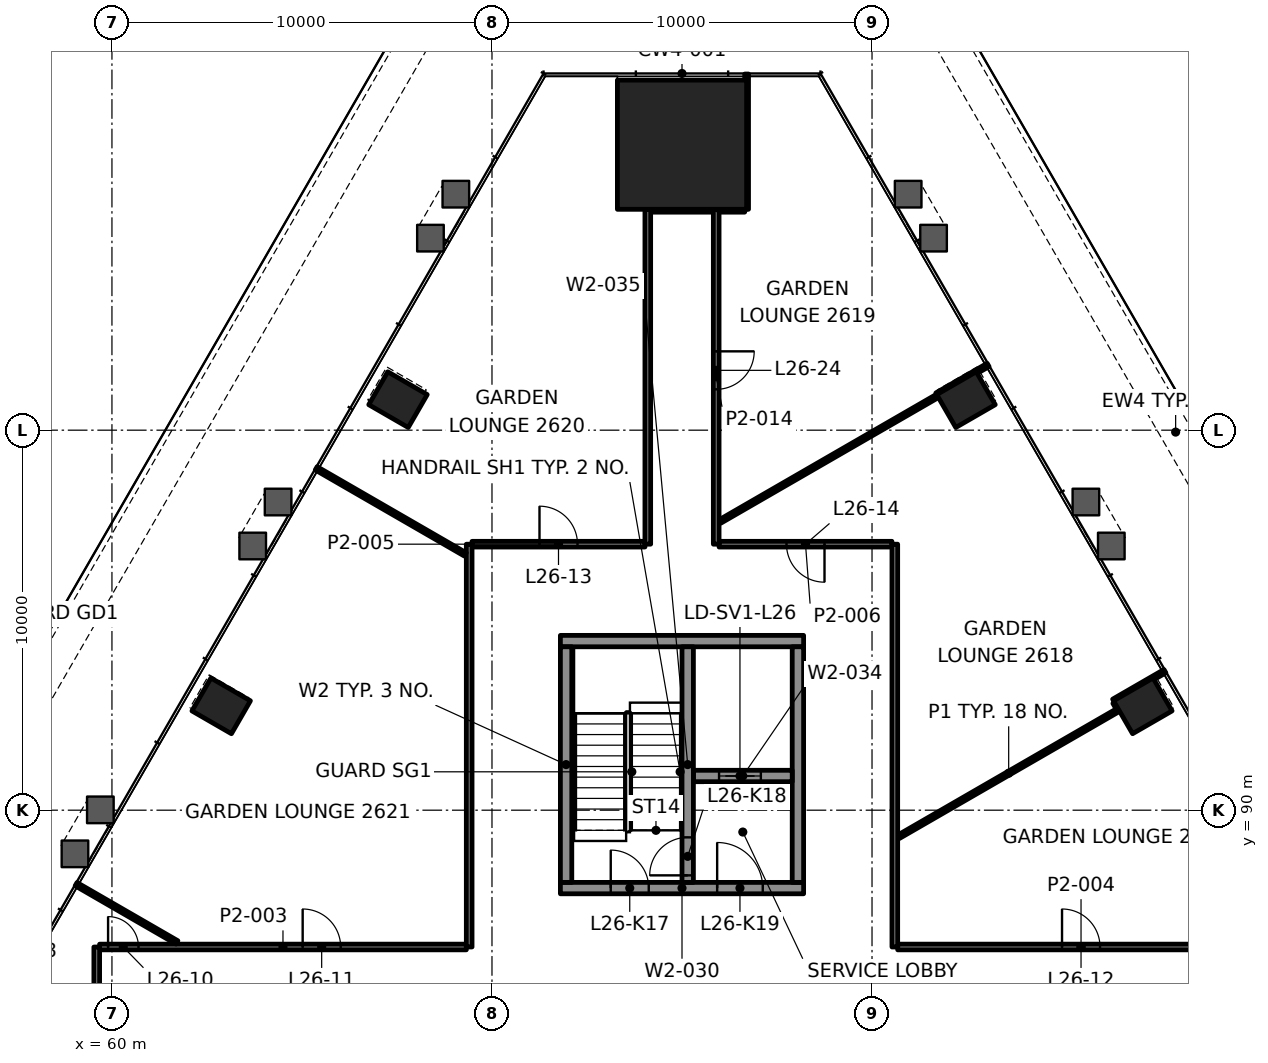
"""IFC4 building model, lengths in metres.
Left out: names, types, materials, properties, quantities, classifications, styles, units other than length and angle.
Written with IfcOpenShell. Run it as: python <this file> out.ifc"""

import sys

from ifc_helpers import new_model, si_unit, direction, frame, frame_2d, origin, origin_2d, place, context, subcontext, project, spatial, rectangle, extrude, element, fill, save


model = new_model("IFC4")
c1 = context("Model", 3, precision=1e-05, world=origin(), true_north=direction((0.0, 1.0)))
c2 = subcontext(c1, "Body", "Model", "MODEL_VIEW")
j1 = project(units=[si_unit("LENGTHUNIT", "METRE"), si_unit("PLANEANGLEUNIT", "RADIAN")], contexts=[c1])
p1 = place(None, origin())
s1 = spatial("IfcSite", under=j1, at=p1, CompositionType="ELEMENT")
p2 = place(p1, origin())
s2 = spatial("IfcBuilding", under=s1, at=p2, CompositionType="ELEMENT")
p3 = place(p2, frame((0.0, 0.0, 115.6)))
s3 = spatial("IfcBuildingStorey", under=s2, at=p3, CompositionType="ELEMENT", Elevation=115.6)
p4 = place(p3, frame((75.0, 107.512, 0.0), z_axis=(0.0, 0.0, 1.0), x_axis=(-1.0, 0.0, 0.0)))
e1 = element("IfcColumn", 1, at=p4, inside=s3, PredefinedType="COLUMN", context=c2, shape_type="SweptSolid", body=[
    extrude(rectangle(XDim=3.4, YDim=3.4, at=origin_2d()), origin(), (0.0, 0.0, 1.0), 4.2),
])
for number, where, z_axis, x_axis in (
    (2, (87.126, 92.745, -0.0), (0.0, 0.0, 1.0), (-0.5, 0.866, 0.0)),
    (3, (82.473, 100.804, -0.0), (0.0, 0.0, 1.0), (-0.5, 0.866, 0.0)),
    (4, (67.527, 100.804, -0.0), (0.0, 0.0, 1.0), (-0.5, -0.866, 0.0)),
    (5, (62.874, 92.745, -0.0), (0.0, 0.0, 1.0), (-0.5, -0.866, 0.0)),
):
    element("IfcColumn", number, at=place(p3, frame(where, z_axis=z_axis, x_axis=x_axis)), inside=s3, PredefinedType="COLUMN", context=c2, shape_type="SweptSolid", body=[
        extrude(rectangle(XDim=1.0, YDim=1.2, at=origin_2d()), origin(), (0.0, 0.0, 1.0), 4.2),
    ])
p5 = place(p3, frame((71.8, 87.95, 0.0), z_axis=(0.0, 0.0, 1.0), x_axis=(1.0, 0.0, 0.0)))
e6 = element("IfcWall", 6, at=p5, inside=s3, PredefinedType="SHEAR", context=c2, shape_type="SweptSolid", body=[
    extrude(rectangle(XDim=6.4, YDim=0.3, at=frame_2d((3.2, 0.0))), origin(), (0.0, 0.0, 1.0), 4.0),
])
p6 = place(p5, frame((1.325, 0.0, 0.0)))
e7 = element("IfcOpeningElement", 7, at=p6, cuts=e6, PredefinedType="OPENING", context=c2, shape_type="SweptSolid", body=[
    extrude(rectangle(XDim=1.0, YDim=2.1, at=frame_2d((0.5, 1.05))), frame((0.0, 0.16, 0.0), z_axis=(0.0, -1.0, 0.0), x_axis=(1.0, 0.0, 0.0)), (0.0, 0.0, 1.0), 0.32),
])
p7 = place(p5, frame((4.125, 0.0, 0.0)))
e8 = element("IfcOpeningElement", 8, at=p7, cuts=e6, PredefinedType="OPENING", context=c2, shape_type="SweptSolid", body=[
    extrude(rectangle(XDim=1.2, YDim=2.1, at=frame_2d((0.6, 1.05))), frame((0.0, 0.16, 0.0), z_axis=(0.0, -1.0, 0.0), x_axis=(1.0, 0.0, 0.0)), (0.0, 0.0, 1.0), 0.32),
])
p8 = place(p3, frame((71.8, 94.45, 0.0), z_axis=(0.0, 0.0, 1.0), x_axis=(1.0, 0.0, 0.0)))
e9 = element("IfcWall", 9, at=p8, inside=s3, PredefinedType="SHEAR", context=c2, shape_type="SweptSolid", body=[
    extrude(rectangle(XDim=6.4, YDim=0.3, at=frame_2d((3.2, 0.0))), origin(), (0.0, 0.0, 1.0), 4.0),
])
for number, where, z_axis, x_axis in (
    (10, (71.95, 88.1, 0.0), (0.0, 0.0, 1.0), (0.0, 1.0, 0.0)),
    (11, (78.05, 88.1, 0.0), (0.0, 0.0, 1.0), (0.0, 1.0, 0.0)),
):
    element("IfcWall", number, at=place(p3, frame(where, z_axis=z_axis, x_axis=x_axis)), inside=s3, PredefinedType="SHEAR", context=c2, shape_type="SweptSolid", body=[
        extrude(rectangle(XDim=6.2, YDim=0.3, at=frame_2d((3.1, 0.0))), origin(), (0.0, 0.0, 1.0), 4.0),
    ])
p9 = place(p3, frame((75.3, 90.9, 0.0), z_axis=(0.0, 0.0, 1.0), x_axis=(1.0, 0.0, 0.0)))
e12 = element("IfcWall", 12, at=p9, inside=s3, PredefinedType="SHEAR", context=c2, shape_type="SweptSolid", body=[
    extrude(rectangle(XDim=2.6, YDim=0.3, at=frame_2d((1.3, 0.0))), origin(), (0.0, 0.0, 1.0), 4.0),
])
p10 = place(p9, frame((0.675, 0.0, 0.0)))
e13 = element("IfcOpeningElement", 13, at=p10, cuts=e12, PredefinedType="OPENING", context=c2, shape_type="SweptSolid", body=[
    extrude(rectangle(XDim=1.1, YDim=2.1, at=frame_2d((0.55, 1.05))), frame((0.0, 0.16, 0.0), z_axis=(0.0, -1.0, 0.0), x_axis=(1.0, 0.0, 0.0)), (0.0, 0.0, 1.0), 0.32),
])
p11 = place(p3, frame((75.15, 88.1, 0.0), z_axis=(0.0, 0.0, 1.0), x_axis=(0.0, 1.0, 0.0)))
e14 = element("IfcWall", 14, at=p11, inside=s3, PredefinedType="SHEAR", context=c2, shape_type="SweptSolid", body=[
    extrude(rectangle(XDim=6.2, YDim=0.3, at=frame_2d((3.1, 0.0))), origin(), (0.0, 0.0, 1.0), 4.0),
])
p12 = place(p11, frame((0.185, 0.0, 0.0)))
e15 = element("IfcOpeningElement", 15, at=p12, cuts=e14, PredefinedType="OPENING", context=c2, shape_type="SweptSolid", body=[
    extrude(rectangle(XDim=1.0, YDim=2.1, at=frame_2d((0.5, 1.05))), frame((0.0, 0.16, 0.0), z_axis=(0.0, -1.0, 0.0), x_axis=(1.0, 0.0, 0.0)), (0.0, 0.0, 1.0), 0.32),
])
p13 = place(p3, frame((59.676, 86.4, 0.0), z_axis=(0.0, 0.0, 1.0), x_axis=(1.0, 0.0, 0.0)))
e16 = element("IfcWall", 16, at=p13, inside=s3, PredefinedType="PARTITIONING", context=c2, shape_type="SweptSolid", body=[
    extrude(rectangle(XDim=9.649, YDim=0.15, at=frame_2d((4.825, 0.0))), origin(), (0.0, 0.0, 1.0), 3.4),
])
p14 = place(p13, frame((0.223, 0.0, 0.0)))
e17 = element("IfcOpeningElement", 17, at=p14, cuts=e16, PredefinedType="OPENING", context=c2, shape_type="SweptSolid", body=[
    extrude(rectangle(XDim=0.8, YDim=2.1, at=frame_2d((0.4, 1.05))), frame((0.0, 0.085, 0.0), z_axis=(0.0, -1.0, 0.0), x_axis=(1.0, 0.0, 0.0)), (0.0, 0.0, 1.0), 0.17),
])
p15 = place(p13, frame((5.343, 0.0, 0.0)))
e18 = element("IfcOpeningElement", 18, at=p15, cuts=e16, PredefinedType="OPENING", context=c2, shape_type="SweptSolid", body=[
    extrude(rectangle(XDim=1.0, YDim=2.1, at=frame_2d((0.5, 1.05))), frame((0.0, 0.085, 0.0), z_axis=(0.0, -1.0, 0.0), x_axis=(1.0, 0.0, 0.0)), (0.0, 0.0, 1.0), 0.17),
])
p16 = place(p3, frame((80.675, 86.4, 0.0), z_axis=(0.0, 0.0, 1.0), x_axis=(1.0, 0.0, 0.0)))
e19 = element("IfcWall", 19, at=p16, inside=s3, PredefinedType="PARTITIONING", context=c2, shape_type="SweptSolid", body=[
    extrude(rectangle(XDim=9.649, YDim=0.15, at=frame_2d((4.825, 0.0))), origin(), (0.0, 0.0, 1.0), 3.4),
])
p17 = place(p16, frame((4.325, 0.0, 0.0)))
e20 = element("IfcOpeningElement", 20, at=p17, cuts=e19, PredefinedType="OPENING", context=c2, shape_type="SweptSolid", body=[
    extrude(rectangle(XDim=1.0, YDim=2.1, at=frame_2d((0.5, 1.05))), frame((0.0, 0.085, 0.0), z_axis=(0.0, -1.0, 0.0), x_axis=(1.0, 0.0, 0.0)), (0.0, 0.0, 1.0), 0.17),
])
p18 = place(p3, frame((69.476, 97.0, 0.0), z_axis=(0.0, 0.0, 1.0), x_axis=(1.0, 0.0, 0.0)))
e21 = element("IfcWall", 21, at=p18, inside=s3, PredefinedType="PARTITIONING", context=c2, shape_type="SweptSolid", body=[
    extrude(rectangle(XDim=4.549, YDim=0.15, at=frame_2d((2.275, 0.0))), origin(), (0.0, 0.0, 1.0), 3.4),
])
p19 = place(p18, frame((1.775, 0.0, 0.0)))
e22 = element("IfcOpeningElement", 22, at=p19, cuts=e21, PredefinedType="OPENING", context=c2, shape_type="SweptSolid", body=[
    extrude(rectangle(XDim=1.0, YDim=2.1, at=frame_2d((0.5, 1.05))), frame((0.0, 0.085, 0.0), z_axis=(0.0, -1.0, 0.0), x_axis=(1.0, 0.0, 0.0)), (0.0, 0.0, 1.0), 0.17),
])
p20 = place(p3, frame((80.524, 97.0, 0.0), z_axis=(0.0, 0.0, 1.0), x_axis=(-1.0, 0.0, 0.0)))
e23 = element("IfcWall", 23, at=p20, inside=s3, PredefinedType="PARTITIONING", context=c2, shape_type="SweptSolid", body=[
    extrude(rectangle(XDim=4.549, YDim=0.15, at=frame_2d((2.275, 0.0))), origin(), (0.0, 0.0, 1.0), 3.4),
])
p21 = place(p20, frame((1.775, 0.0, 0.0)))
e24 = element("IfcOpeningElement", 24, at=p21, cuts=e23, PredefinedType="OPENING", context=c2, shape_type="SweptSolid", body=[
    extrude(rectangle(XDim=1.0, YDim=2.1, at=frame_2d((0.5, 1.05))), frame((0.0, 0.085, 0.0), z_axis=(0.0, -1.0, 0.0), x_axis=(1.0, 0.0, 0.0)), (0.0, 0.0, 1.0), 0.17),
])
p22 = place(p3, frame((74.176, 105.812, 0.0), z_axis=(0.0, 0.0, 1.0), x_axis=(1.0, 0.0, 0.0)))
e25 = element("IfcWall", 25, at=p22, inside=s3, PredefinedType="PARTITIONING", context=c2, shape_type="SweptSolid", body=[
    extrude(rectangle(XDim=1.649, YDim=0.15, at=frame_2d((0.825, 0.0))), origin(), (0.0, 0.0, 1.0), 3.397),
])
p23 = place(p3, frame((80.701, 89.302, 0.0), z_axis=(0.0, 0.0, 1.0), x_axis=(0.866032345022, 0.499987977232, 0.0)))
e26 = element("IfcWall", 26, at=p23, inside=s3, PredefinedType="PARTITIONING", context=c2, shape_type="SweptSolid", body=[
    extrude(rectangle(XDim=6.686, YDim=0.1, at=frame_2d((3.343, 0.0))), origin(), (0.0, 0.0, 1.0), 3.4),
])
p24 = place(p3, frame((86.356, 92.879, 0.0), z_axis=(0.0, 0.0, 1.0), x_axis=(0.866018739521, 0.500011542666, 0.0)))
e27 = element("IfcWall", 27, at=p24, inside=s3, PredefinedType="PARTITIONING", context=c2, shape_type="SweptSolid", body=[
    extrude(rectangle(XDim=1.56, YDim=0.1, at=frame_2d((0.78, 0.0))), origin(), (0.0, 0.0, 1.0), 3.165),
])
p25 = place(p3, frame((76.001, 97.598, 0.0), z_axis=(0.0, 0.0, 1.0), x_axis=(0.866017611601, 0.500013496215, 0.0)))
e28 = element("IfcWall", 28, at=p25, inside=s3, PredefinedType="PARTITIONING", context=c2, shape_type="SweptSolid", body=[
    extrude(rectangle(XDim=6.608, YDim=0.1, at=frame_2d((3.304, 0.0))), origin(), (0.0, 0.0, 1.0), 3.4),
])
p26 = place(p3, frame((81.704, 100.937, 0.0), z_axis=(0.0, 0.0, 1.0), x_axis=(0.865990094875, 0.500061151839, 0.0)))
e29 = element("IfcWall", 29, at=p26, inside=s3, PredefinedType="PARTITIONING", context=c2, shape_type="SweptSolid", body=[
    extrude(rectangle(XDim=1.56, YDim=0.1, at=frame_2d((0.78, 0.0))), origin(), (0.0, 0.0, 1.0), 3.4),
])
p27 = place(p3, frame((80.6, 86.4, 0.0), z_axis=(0.0, 0.0, 1.0), x_axis=(0.0, 1.0, 0.0)))
e30 = element("IfcWall", 30, at=p27, inside=s3, PredefinedType="PARTITIONING", context=c2, shape_type="SweptSolid", body=[
    extrude(rectangle(XDim=10.6, YDim=0.15, at=frame_2d((5.3, 0.0))), origin(), (0.0, 0.0, 1.0), 3.322),
])
p28 = place(p3, frame((76.7, 105.813, 0.0), z_axis=(0.0, 0.0, 1.0), x_axis=(0.0, 1.0, 0.0)))
e31 = element("IfcWall", 31, at=p28, inside=s3, PredefinedType="PARTITIONING", context=c2, shape_type="SweptSolid", body=[
    extrude(rectangle(XDim=3.559, YDim=0.1, at=frame_2d((1.78, 0.0))), origin(), (0.0, 0.0, 1.0), 3.4),
])
p29 = place(p3, frame((75.9, 105.812, 0.0), z_axis=(0.0, 0.0, 1.0), x_axis=(0.0, -1.0, 0.0)))
e32 = element("IfcWall", 32, at=p29, inside=s3, PredefinedType="PARTITIONING", context=c2, shape_type="SweptSolid", body=[
    extrude(rectangle(XDim=8.812, YDim=0.15, at=frame_2d((4.406, 0.0))), origin(), (0.0, 0.0, 1.0), 3.4),
])
p30 = place(p29, frame((3.738, 0.0, 0.0)))
e33 = element("IfcOpeningElement", 33, at=p30, cuts=e32, PredefinedType="OPENING", context=c2, shape_type="SweptSolid", body=[
    extrude(rectangle(XDim=1.0, YDim=2.1, at=frame_2d((0.5, 1.05))), frame((0.0, 0.085, 0.0), z_axis=(0.0, -1.0, 0.0), x_axis=(1.0, 0.0, 0.0)), (0.0, 0.0, 1.0), 0.17),
])
p31 = place(p3, frame((74.1, 97.0, 0.0), z_axis=(0.0, 0.0, 1.0), x_axis=(0.0, 1.0, 0.0)))
e34 = element("IfcWall", 34, at=p31, inside=s3, PredefinedType="PARTITIONING", context=c2, shape_type="SweptSolid", body=[
    extrude(rectangle(XDim=8.812, YDim=0.15, at=frame_2d((4.406, 0.0))), origin(), (0.0, 0.0, 1.0), 3.4),
])
p32 = place(p3, frame((69.4, 86.4, 0.0), z_axis=(0.0, 0.0, 1.0), x_axis=(0.0, 1.0, 0.0)))
e35 = element("IfcWall", 35, at=p32, inside=s3, PredefinedType="PARTITIONING", context=c2, shape_type="SweptSolid", body=[
    extrude(rectangle(XDim=10.6, YDim=0.15, at=frame_2d((5.3, 0.0))), origin(), (0.0, 0.0, 1.0), 3.322),
])
p33 = place(p3, frame((59.6, 67.148, 0.0), z_axis=(0.0, 0.0, 1.0), x_axis=(0.0, 1.0, 0.0)))
e36 = element("IfcWall", 36, at=p33, inside=s3, PredefinedType="PARTITIONING", context=c2, shape_type="SweptSolid", body=[
    extrude(rectangle(XDim=19.251, YDim=0.15, at=frame_2d((9.626, 0.0))), origin(), (0.0, 0.0, 1.0), 3.4),
])
p34 = place(p3, frame((86.466, 92.688, 0.0), z_axis=(0.0, 0.0, 1.0), x_axis=(-0.500013496215, 0.866017611601, 0.0)))
e37 = element("IfcWall", 37, at=p34, inside=s3, PredefinedType="PARTITIONING", context=c2, shape_type="SweptSolid", body=[
    extrude(rectangle(XDim=0.169, YDim=0.1, at=frame_2d((0.085, 0.0))), origin(), (0.0, 0.0, 1.0), 3.4),
])
p35 = place(p3, frame((69.299, 96.73, 0.0), z_axis=(0.0, 0.0, 1.0), x_axis=(-0.866033061154, 0.499986736812, 0.0)))
e38 = element("IfcWall", 38, at=p35, inside=s3, PredefinedType="PARTITIONING", context=c2, shape_type="SweptSolid", body=[
    extrude(rectangle(XDim=4.531, YDim=0.1, at=frame_2d((2.266, 0.0))), origin(), (0.0, 0.0, 1.0), 3.165),
])
p36 = place(p3, frame((61.71, 86.52, 0.0), z_axis=(0.0, 0.0, 1.0), x_axis=(-0.866038331766, 0.499977607411, 0.0)))
e39 = element("IfcWall", 39, at=p36, inside=s3, PredefinedType="PARTITIONING", context=c2, shape_type="SweptSolid", body=[
    extrude(rectangle(XDim=3.065, YDim=0.1, at=frame_2d((1.532, 0.0))), origin(), (0.0, 0.0, 1.0), 3.165),
])
p37 = place(p3, frame((75.975, 105.812, 0.0), z_axis=(0.0, 0.0, 1.0), x_axis=(1.0, 0.0, 0.0)))
e40 = element("IfcWall", 40, at=p37, inside=s3, PredefinedType="PARTITIONING", context=c2, shape_type="SweptSolid", body=[
    extrude(rectangle(XDim=0.674, YDim=0.15, at=frame_2d((0.337, 0.0))), origin(), (0.0, 0.0, 1.0), 3.4),
])
p38 = place(p3, frame((95.095, 87.641, 0.0), z_axis=(0.0, 0.0, 1.0), x_axis=(-0.500002252739, 0.866024103161, 0.0)))
e41 = element("IfcWall", 41, at=p38, inside=s3, PredefinedType="SOLIDWALL", context=c2, shape_type="SweptSolid", body=[
    extrude(rectangle(XDim=28.425, YDim=0.8, at=frame_2d((14.212, 0.0))), origin(), (0.0, 0.0, 1.0), 0.9),
])
p39 = place(p3, frame((69.117, 112.258, 0.0), z_axis=(0.0, 0.0, 1.0), x_axis=(-0.5000008632, -0.866024905415, 0.0)))
e42 = element("IfcWall", 42, at=p39, inside=s3, PredefinedType="SOLIDWALL", context=c2, shape_type="SweptSolid", body=[
    extrude(rectangle(XDim=40.13, YDim=0.8, at=frame_2d((20.065, 0.0))), origin(), (0.0, 0.0, 1.0), 0.9),
])
p40 = place(p14, origin())
e43 = element("IfcDoor", 43, at=p40, inside=s3, OperationType="SINGLE_SWING_LEFT", PredefinedType="DOOR", context=c2, shape_type="SweptSolid", body=[
    extrude(rectangle(XDim=0.8, YDim=2.1, at=frame_2d((0.4, 1.05))), frame((0.0, 0.025, 0.0), z_axis=(0.0, -1.0, 0.0), x_axis=(1.0, 0.0, 0.0)), (0.0, 0.0, 1.0), 0.05),
])
fill(e17, e43)
p41 = place(p15, origin())
e44 = element("IfcDoor", 44, at=p41, inside=s3, OperationType="SINGLE_SWING_RIGHT", PredefinedType="DOOR", context=c2, shape_type="SweptSolid", body=[
    extrude(rectangle(XDim=1.0, YDim=2.1, at=frame_2d((0.5, 1.05))), frame((0.0, 0.025, 0.0), z_axis=(0.0, -1.0, 0.0), x_axis=(1.0, 0.0, 0.0)), (0.0, 0.0, 1.0), 0.05),
])
fill(e18, e44)
p42 = place(p17, origin())
e45 = element("IfcDoor", 45, at=p42, inside=s3, OperationType="SINGLE_SWING_RIGHT", PredefinedType="DOOR", context=c2, shape_type="SweptSolid", body=[
    extrude(rectangle(XDim=1.0, YDim=2.1, at=frame_2d((0.5, 1.05))), frame((0.0, 0.025, 0.0), z_axis=(0.0, -1.0, 0.0), x_axis=(1.0, 0.0, 0.0)), (0.0, 0.0, 1.0), 0.05),
])
fill(e20, e45)
p43 = place(p19, origin())
e46 = element("IfcDoor", 46, at=p43, inside=s3, OperationType="SINGLE_SWING_LEFT", PredefinedType="DOOR", context=c2, shape_type="SweptSolid", body=[
    extrude(rectangle(XDim=1.0, YDim=2.1, at=frame_2d((0.5, 1.05))), frame((0.0, 0.025, 0.0), z_axis=(0.0, -1.0, 0.0), x_axis=(1.0, 0.0, 0.0)), (0.0, 0.0, 1.0), 0.05),
])
fill(e22, e46)
p44 = place(p21, origin())
e47 = element("IfcDoor", 47, at=p44, inside=s3, OperationType="SINGLE_SWING_RIGHT", PredefinedType="DOOR", context=c2, shape_type="SweptSolid", body=[
    extrude(rectangle(XDim=1.0, YDim=2.1, at=frame_2d((0.5, 1.05))), frame((0.0, 0.025, 0.0), z_axis=(0.0, -1.0, 0.0), x_axis=(1.0, 0.0, 0.0)), (0.0, 0.0, 1.0), 0.05),
])
fill(e24, e47)
p45 = place(p30, origin())
e48 = element("IfcDoor", 48, at=p45, inside=s3, OperationType="SINGLE_SWING_LEFT", PredefinedType="DOOR", context=c2, shape_type="SweptSolid", body=[
    extrude(rectangle(XDim=1.0, YDim=2.1, at=frame_2d((0.5, 1.05))), frame((0.0, 0.025, 0.0), z_axis=(0.0, -1.0, 0.0), x_axis=(1.0, 0.0, 0.0)), (0.0, 0.0, 1.0), 0.05),
])
fill(e33, e48)
p46 = place(p10, origin())
e49 = element("IfcDoor", 49, at=p46, inside=s3, OperationType="DOUBLE_DOOR_SLIDING", PredefinedType="DOOR", context=c2, shape_type="SweptSolid", body=[
    extrude(rectangle(XDim=1.1, YDim=2.1, at=frame_2d((0.55, 1.05))), frame((0.0, 0.025, 0.0), z_axis=(0.0, -1.0, 0.0), x_axis=(1.0, 0.0, 0.0)), (0.0, 0.0, 1.0), 0.05),
])
fill(e13, e49)
p47 = place(p6, origin())
e50 = element("IfcDoor", 50, at=p47, inside=s3, OperationType="SINGLE_SWING_RIGHT", PredefinedType="DOOR", context=c2, shape_type="SweptSolid", body=[
    extrude(rectangle(XDim=1.0, YDim=2.1, at=frame_2d((0.5, 1.05))), frame((0.0, 0.025, 0.0), z_axis=(0.0, -1.0, 0.0), x_axis=(1.0, 0.0, 0.0)), (0.0, 0.0, 1.0), 0.05),
])
fill(e7, e50)
p48 = place(p12, origin())
e51 = element("IfcDoor", 51, at=p48, inside=s3, OperationType="SINGLE_SWING_LEFT", PredefinedType="DOOR", context=c2, shape_type="SweptSolid", body=[
    extrude(rectangle(XDim=1.0, YDim=2.1, at=frame_2d((0.5, 1.05))), frame((0.0, 0.025, 0.0), z_axis=(0.0, -1.0, 0.0), x_axis=(1.0, 0.0, 0.0)), (0.0, 0.0, 1.0), 0.05),
])
fill(e15, e51)
p49 = place(p7, origin())
e52 = element("IfcDoor", 52, at=p49, inside=s3, OperationType="SINGLE_SWING_RIGHT", PredefinedType="DOOR", context=c2, shape_type="SweptSolid", body=[
    extrude(rectangle(XDim=1.2, YDim=2.1, at=frame_2d((0.6, 1.05))), frame((0.0, 0.025, 0.0), z_axis=(0.0, -1.0, 0.0), x_axis=(1.0, 0.0, 0.0)), (0.0, 0.0, 1.0), 0.05),
])
fill(e8, e52)
save(model, sys.argv[1])
